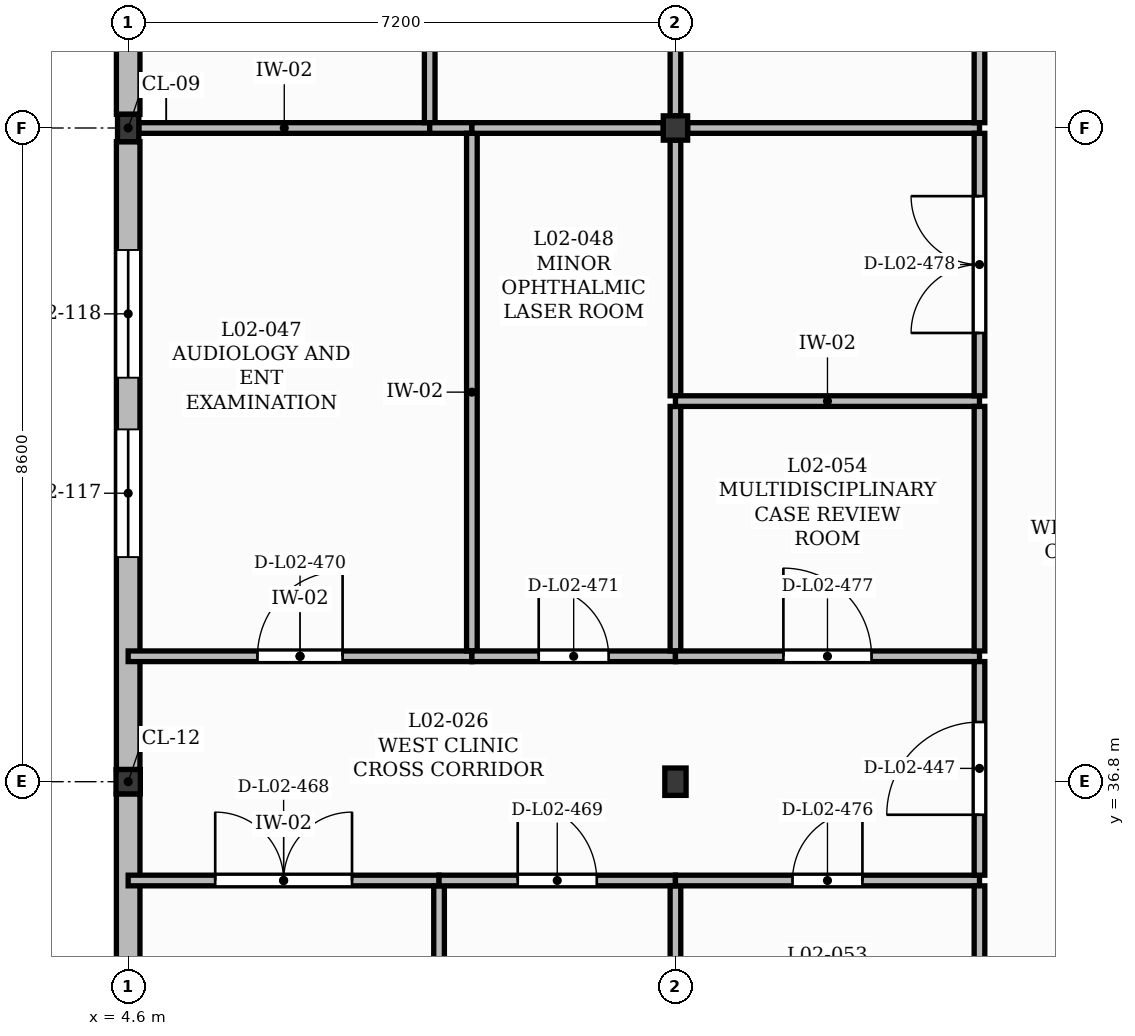
"""IFC4 building model, lengths in metres.
Left out: names, types, materials, properties, quantities, classifications, styles, units other than length and angle.
Written with IfcOpenShell. Run it as: python <this file> out.ifc"""

import sys

from ifc_helpers import new_model, si_unit, direction, frame, frame_2d, origin, origin_2d, place, context, subcontext, project, spatial, rectangle, extrude, element, fill, save


model = new_model("IFC4")
c1 = context("Model", 3, precision=1e-05, world=origin(), true_north=direction((0.0, 1.0)))
c2 = subcontext(c1, "Body", "Model", "MODEL_VIEW")
j1 = project(units=[si_unit("LENGTHUNIT", "METRE"), si_unit("PLANEANGLEUNIT", "RADIAN")], contexts=[c1])
p1 = place(None, origin())
s1 = spatial("IfcSite", under=j1, at=p1, CompositionType="ELEMENT")
p2 = place(p1, origin())
s2 = spatial("IfcBuilding", under=s1, at=p2, CompositionType="ELEMENT")
p3 = place(p2, frame((0.0, 0.0, 9.0)))
s3 = spatial("IfcBuildingStorey", under=s2, at=p3, CompositionType="ELEMENT", Elevation=9.0)
p4 = place(p3, frame((4.6, 36.8, 0.0), z_axis=(0.0, 0.0, 1.0), x_axis=(1.0, 0.0, 0.0)))
e1 = element("IfcColumn", 1, at=p4, inside=s3, PredefinedType="COLUMN", context=c2, shape_type="SweptSolid", body=[
    extrude(rectangle(XDim=0.32, YDim=0.32, at=origin_2d()), origin(), (0.0, 0.0, 1.0), 3.99),
])
for number, where, z_axis, x_axis in (
    (2, (4.6, 45.4, 0.0), (0.0, 0.0, 1.0), (1.0, 0.0, 0.0)),
    (3, (11.8, 36.8, 0.0), (0.0, 0.0, 1.0), (1.0, 0.0, 0.0)),
):
    element("IfcColumn", number, at=place(p3, frame(where, z_axis=z_axis, x_axis=x_axis)), inside=s3, PredefinedType="COLUMN", context=c2, shape_type="SweptSolid", body=[
        extrude(rectangle(XDim=0.28, YDim=0.36, at=origin_2d()), origin(), (0.0, 0.0, 1.0), 3.99),
    ])
p5 = place(p3, frame((11.8, 45.4, 0.0), z_axis=(0.0, 0.0, 1.0), x_axis=(1.0, 0.0, 0.0)))
e4 = element("IfcColumn", 4, at=p5, inside=s3, PredefinedType="COLUMN", context=c2, shape_type="SweptSolid", body=[
    extrude(rectangle(XDim=0.32, YDim=0.32, at=origin_2d()), origin(), (0.0, 0.0, 1.0), 3.99),
])
p6 = place(p3, frame((4.6, 27.38, 0.0), z_axis=(0.0, 0.0, 1.0), x_axis=(0.0, 1.0, 0.0)))
e5 = element("IfcWall", 5, at=p6, inside=s3, PredefinedType="SOLIDWALL", context=c2, shape_type="SweptSolid", body=[
    extrude(rectangle(XDim=9.26, YDim=0.31, at=frame_2d((4.63, 0.0))), origin(), (0.0, 0.0, 1.0), 3.53),
])
p7 = place(p6, frame((2.38, 0.0, 1.05)))
e6 = element("IfcOpeningElement", 6, at=p7, cuts=e5, PredefinedType="OPENING", context=c2, shape_type="SweptSolid", body=[
    extrude(rectangle(XDim=1.4, YDim=1.65, at=frame_2d((0.7, 0.825))), frame((0.0, 0.165, 0.0), z_axis=(0.0, -1.0, 0.0), x_axis=(1.0, 0.0, 0.0)), (0.0, 0.0, 1.0), 0.33),
])
p8 = place(p6, frame((4.46, 0.0, 1.05)))
e7 = element("IfcOpeningElement", 7, at=p8, cuts=e5, PredefinedType="OPENING", context=c2, shape_type="SweptSolid", body=[
    extrude(rectangle(XDim=1.4, YDim=1.65, at=frame_2d((0.7, 0.825))), frame((0.0, 0.165, 0.0), z_axis=(0.0, -1.0, 0.0), x_axis=(1.0, 0.0, 0.0)), (0.0, 0.0, 1.0), 0.33),
])
p9 = place(p3, frame((4.6, 36.96, 0.0), z_axis=(0.0, 0.0, 1.0), x_axis=(0.0, 1.0, 0.0)))
e8 = element("IfcWall", 8, at=p9, inside=s3, PredefinedType="SOLIDWALL", context=c2, shape_type="SweptSolid", body=[
    extrude(rectangle(XDim=8.26, YDim=0.31, at=frame_2d((4.13, 0.0))), origin(), (0.0, 0.0, 1.0), 3.53),
])
p10 = place(p9, frame((2.795, 0.0, 1.05)))
e9 = element("IfcOpeningElement", 9, at=p10, cuts=e8, PredefinedType="OPENING", context=c2, shape_type="SweptSolid", body=[
    extrude(rectangle(XDim=1.68, YDim=1.65, at=frame_2d((0.84, 0.825))), frame((0.0, 0.165, 0.0), z_axis=(0.0, -1.0, 0.0), x_axis=(1.0, 0.0, 0.0)), (0.0, 0.0, 1.0), 0.33),
])
p11 = place(p9, frame((5.155, 0.0, 1.05)))
e10 = element("IfcOpeningElement", 10, at=p11, cuts=e8, PredefinedType="OPENING", context=c2, shape_type="SweptSolid", body=[
    extrude(rectangle(XDim=1.68, YDim=1.65, at=frame_2d((0.84, 0.825))), frame((0.0, 0.165, 0.0), z_axis=(0.0, -1.0, 0.0), x_axis=(1.0, 0.0, 0.0)), (0.0, 0.0, 1.0), 0.33),
])
p12 = place(p3, frame((4.6, 45.58, 0.0), z_axis=(0.0, 0.0, 1.0), x_axis=(0.0, 1.0, 0.0)))
e11 = element("IfcWall", 11, at=p12, inside=s3, PredefinedType="SOLIDWALL", context=c2, shape_type="SweptSolid", body=[
    extrude(rectangle(XDim=6.86, YDim=0.31, at=frame_2d((3.43, 0.0))), origin(), (0.0, 0.0, 1.0), 3.53),
])
p13 = place(p12, frame((1.59, 0.0, 1.05)))
e12 = element("IfcOpeningElement", 12, at=p13, cuts=e11, PredefinedType="OPENING", context=c2, shape_type="SweptSolid", body=[
    extrude(rectangle(XDim=1.96, YDim=1.65, at=frame_2d((0.98, 0.825))), frame((0.0, 0.165, 0.0), z_axis=(0.0, -1.0, 0.0), x_axis=(1.0, 0.0, 0.0)), (0.0, 0.0, 1.0), 0.33),
])
p14 = place(p3, frame((4.6, 35.5, 0.0), z_axis=(0.0, 0.0, 1.0), x_axis=(1.0, 0.0, 0.0)))
e13 = element("IfcWall", 13, at=p14, inside=s3, PredefinedType="PARTITIONING", context=c2, shape_type="SweptSolid", body=[
    extrude(rectangle(XDim=4.09, YDim=0.14, at=frame_2d((2.045, 0.0))), origin(), (0.0, 0.0, 1.0), 3.96),
])
p15 = place(p14, frame((1.145, 0.0, 0.0)))
e14 = element("IfcOpeningElement", 14, at=p15, cuts=e13, PredefinedType="OPENING", context=c2, shape_type="SweptSolid", body=[
    extrude(rectangle(XDim=1.8, YDim=2.3, at=frame_2d((0.9, 1.15))), frame((0.0, 0.08, 0.0), z_axis=(0.0, -1.0, 0.0), x_axis=(1.0, 0.0, 0.0)), (0.0, 0.0, 1.0), 0.16),
])
p16 = place(p3, frame((4.6, 38.45, 0.0), z_axis=(0.0, 0.0, 1.0), x_axis=(1.0, 0.0, 0.0)))
e15 = element("IfcWall", 15, at=p16, inside=s3, PredefinedType="PARTITIONING", context=c2, shape_type="SweptSolid", body=[
    extrude(rectangle(XDim=4.522, YDim=0.14, at=frame_2d((2.261, 0.0))), origin(), (0.0, 0.0, 1.0), 3.96),
])
p17 = place(p16, frame((1.701, 0.0, 0.0)))
e16 = element("IfcOpeningElement", 16, at=p17, cuts=e15, PredefinedType="OPENING", context=c2, shape_type="SweptSolid", body=[
    extrude(rectangle(XDim=1.12, YDim=2.15, at=frame_2d((0.56, 1.075))), frame((0.0, 0.08, 0.0), z_axis=(0.0, -1.0, 0.0), x_axis=(1.0, 0.0, 0.0)), (0.0, 0.0, 1.0), 0.16),
])
p18 = place(p3, frame((4.74, 45.4, 0.0), z_axis=(0.0, 0.0, 1.0), x_axis=(1.0, 0.0, 0.0)))
e17 = element("IfcWall", 17, at=p18, inside=s3, PredefinedType="PARTITIONING", context=c2, shape_type="SweptSolid", body=[
    extrude(rectangle(XDim=3.827, YDim=0.14, at=frame_2d((1.914, 0.0))), origin(), (0.0, 0.0, 1.0), 3.39),
])
p19 = place(p3, frame((8.567, 45.47, 0.0), z_axis=(0.0, 0.0, 1.0), x_axis=(0.0, 1.0, 0.0)))
e18 = element("IfcWall", 18, at=p19, inside=s3, PredefinedType="PARTITIONING", context=c2, shape_type="SweptSolid", body=[
    extrude(rectangle(XDim=5.06, YDim=0.14, at=frame_2d((2.53, 0.0))), origin(), (0.0, 0.0, 1.0), 3.96),
])
p20 = place(p3, frame((8.567, 45.4, 0.0), z_axis=(0.0, 0.0, 1.0), x_axis=(1.0, 0.0, 0.0)))
e19 = element("IfcWall", 19, at=p20, inside=s3, PredefinedType="PARTITIONING", context=c2, shape_type="SweptSolid", body=[
    extrude(rectangle(XDim=0.555, YDim=0.14, at=frame_2d((0.278, 0.0))), origin(), (0.0, 0.0, 1.0), 3.39),
])
p21 = place(p3, frame((8.69, 27.2, 0.0), z_axis=(0.0, 0.0, 1.0), x_axis=(0.0, 1.0, 0.0)))
e20 = element("IfcWall", 20, at=p21, inside=s3, PredefinedType="PARTITIONING", context=c2, shape_type="SweptSolid", body=[
    extrude(rectangle(XDim=8.23, YDim=0.14, at=frame_2d((4.115, 0.0))), origin(), (0.0, 0.0, 1.0), 3.96),
])
p22 = place(p3, frame((8.69, 35.5, 0.0), z_axis=(0.0, 0.0, 1.0), x_axis=(1.0, 0.0, 0.0)))
e21 = element("IfcWall", 21, at=p22, inside=s3, PredefinedType="PARTITIONING", context=c2, shape_type="SweptSolid", body=[
    extrude(rectangle(XDim=3.11, YDim=0.14, at=frame_2d((1.555, 0.0))), origin(), (0.0, 0.0, 1.0), 3.96),
])
p23 = place(p22, frame((1.035, 0.0, 0.0)))
e22 = element("IfcOpeningElement", 22, at=p23, cuts=e21, PredefinedType="OPENING", context=c2, shape_type="SweptSolid", body=[
    extrude(rectangle(XDim=1.04, YDim=2.1, at=frame_2d((0.52, 1.05))), frame((0.0, 0.08, 0.0), z_axis=(0.0, -1.0, 0.0), x_axis=(1.0, 0.0, 0.0)), (0.0, 0.0, 1.0), 0.16),
])
p24 = place(p3, frame((9.122, 38.52, 0.0), z_axis=(0.0, 0.0, 1.0), x_axis=(0.0, 1.0, 0.0)))
e23 = element("IfcWall", 23, at=p24, inside=s3, PredefinedType="PARTITIONING", context=c2, shape_type="SweptSolid", body=[
    extrude(rectangle(XDim=6.81, YDim=0.14, at=frame_2d((3.405, 0.0))), origin(), (0.0, 0.0, 1.0), 3.96),
])
p25 = place(p3, frame((9.122, 38.45, 0.0), z_axis=(0.0, 0.0, 1.0), x_axis=(1.0, 0.0, 0.0)))
e24 = element("IfcWall", 24, at=p25, inside=s3, PredefinedType="PARTITIONING", context=c2, shape_type="SweptSolid", body=[
    extrude(rectangle(XDim=2.678, YDim=0.14, at=frame_2d((1.339, 0.0))), origin(), (0.0, 0.0, 1.0), 3.96),
])
p26 = place(p25, frame((0.879, 0.0, 0.0)))
e25 = element("IfcOpeningElement", 25, at=p26, cuts=e24, PredefinedType="OPENING", context=c2, shape_type="SweptSolid", body=[
    extrude(rectangle(XDim=0.92, YDim=2.1, at=frame_2d((0.46, 1.05))), frame((0.0, 0.08, 0.0), z_axis=(0.0, -1.0, 0.0), x_axis=(1.0, 0.0, 0.0)), (0.0, 0.0, 1.0), 0.16),
])
p27 = place(p3, frame((9.122, 45.4, 0.0), z_axis=(0.0, 0.0, 1.0), x_axis=(1.0, 0.0, 0.0)))
e26 = element("IfcWall", 26, at=p27, inside=s3, PredefinedType="PARTITIONING", context=c2, shape_type="SweptSolid", body=[
    extrude(rectangle(XDim=2.518, YDim=0.14, at=frame_2d((1.259, 0.0))), origin(), (0.0, 0.0, 1.0), 3.39),
])
p28 = place(p3, frame((11.8, 32.192, 0.0), z_axis=(0.0, 0.0, 1.0), x_axis=(0.0, 1.0, 0.0)))
e27 = element("IfcWall", 27, at=p28, inside=s3, PredefinedType="PARTITIONING", context=c2, shape_type="SweptSolid", body=[
    extrude(rectangle(XDim=3.238, YDim=0.14, at=frame_2d((1.619, 0.0))), origin(), (0.0, 0.0, 1.0), 3.35),
])
p29 = place(p3, frame((11.8, 35.5, 0.0), z_axis=(0.0, 0.0, 1.0), x_axis=(1.0, 0.0, 0.0)))
e28 = element("IfcWall", 28, at=p29, inside=s3, PredefinedType="PARTITIONING", context=c2, shape_type="SweptSolid", body=[
    extrude(rectangle(XDim=4.0, YDim=0.14, at=frame_2d((2.0, 0.0))), origin(), (0.0, 0.0, 1.0), 3.96),
])
p30 = place(p29, frame((1.54, 0.0, 0.0)))
e29 = element("IfcOpeningElement", 29, at=p30, cuts=e28, PredefinedType="OPENING", context=c2, shape_type="SweptSolid", body=[
    extrude(rectangle(XDim=0.92, YDim=2.1, at=frame_2d((0.46, 1.05))), frame((0.0, 0.08, 0.0), z_axis=(0.0, -1.0, 0.0), x_axis=(1.0, 0.0, 0.0)), (0.0, 0.0, 1.0), 0.16),
])
p31 = place(p3, frame((11.8, 38.52, 0.0), z_axis=(0.0, 0.0, 1.0), x_axis=(0.0, 1.0, 0.0)))
e30 = element("IfcWall", 30, at=p31, inside=s3, PredefinedType="PARTITIONING", context=c2, shape_type="SweptSolid", body=[
    extrude(rectangle(XDim=3.217, YDim=0.14, at=frame_2d((1.608, 0.0))), origin(), (0.0, 0.0, 1.0), 3.35),
])
p32 = place(p3, frame((11.8, 38.45, 0.0), z_axis=(0.0, 0.0, 1.0), x_axis=(1.0, 0.0, 0.0)))
e31 = element("IfcWall", 31, at=p32, inside=s3, PredefinedType="PARTITIONING", context=c2, shape_type="SweptSolid", body=[
    extrude(rectangle(XDim=4.0, YDim=0.14, at=frame_2d((2.0, 0.0))), origin(), (0.0, 0.0, 1.0), 3.96),
])
p33 = place(p32, frame((1.42, 0.0, 0.0)))
e32 = element("IfcOpeningElement", 32, at=p33, cuts=e31, PredefinedType="OPENING", context=c2, shape_type="SweptSolid", body=[
    extrude(rectangle(XDim=1.16, YDim=2.1, at=frame_2d((0.58, 1.05))), frame((0.0, 0.08, 0.0), z_axis=(0.0, -1.0, 0.0), x_axis=(1.0, 0.0, 0.0)), (0.0, 0.0, 1.0), 0.16),
])
p34 = place(p3, frame((11.8, 41.877, 0.0), z_axis=(0.0, 0.0, 1.0), x_axis=(0.0, 1.0, 0.0)))
e33 = element("IfcWall", 33, at=p34, inside=s3, PredefinedType="PARTITIONING", context=c2, shape_type="SweptSolid", body=[
    extrude(rectangle(XDim=3.363, YDim=0.14, at=frame_2d((1.682, 0.0))), origin(), (0.0, 0.0, 1.0), 3.35),
])
p35 = place(p3, frame((11.8, 41.807, 0.0), z_axis=(0.0, 0.0, 1.0), x_axis=(1.0, 0.0, 0.0)))
e34 = element("IfcWall", 34, at=p35, inside=s3, PredefinedType="PARTITIONING", context=c2, shape_type="SweptSolid", body=[
    extrude(rectangle(XDim=4.0, YDim=0.14, at=frame_2d((2.0, 0.0))), origin(), (0.0, 0.0, 1.0), 3.96),
])
p36 = place(p3, frame((11.8, 45.56, 0.0), z_axis=(0.0, 0.0, 1.0), x_axis=(0.0, 1.0, 0.0)))
e35 = element("IfcWall", 35, at=p36, inside=s3, PredefinedType="PARTITIONING", context=c2, shape_type="SweptSolid", body=[
    extrude(rectangle(XDim=4.97, YDim=0.14, at=frame_2d((2.485, 0.0))), origin(), (0.0, 0.0, 1.0), 3.47),
])
p37 = place(p3, frame((11.96, 45.4, 0.0), z_axis=(0.0, 0.0, 1.0), x_axis=(1.0, 0.0, 0.0)))
e36 = element("IfcWall", 36, at=p37, inside=s3, PredefinedType="PARTITIONING", context=c2, shape_type="SweptSolid", body=[
    extrude(rectangle(XDim=3.84, YDim=0.14, at=frame_2d((1.92, 0.0))), origin(), (0.0, 0.0, 1.0), 3.31),
])
p38 = place(p3, frame((15.8, 32.192, 0.0), z_axis=(0.0, 0.0, 1.0), x_axis=(0.0, 1.0, 0.0)))
e37 = element("IfcWall", 37, at=p38, inside=s3, PredefinedType="PARTITIONING", context=c2, shape_type="SweptSolid", body=[
    extrude(rectangle(XDim=3.238, YDim=0.14, at=frame_2d((1.619, 0.0))), origin(), (0.0, 0.0, 1.0), 3.96),
])
p39 = place(p3, frame((15.8, 35.57, 0.0), z_axis=(0.0, 0.0, 1.0), x_axis=(0.0, 1.0, 0.0)))
e38 = element("IfcWall", 38, at=p39, inside=s3, PredefinedType="PARTITIONING", context=c2, shape_type="SweptSolid", body=[
    extrude(rectangle(XDim=2.81, YDim=0.14, at=frame_2d((1.405, 0.0))), origin(), (0.0, 0.0, 1.0), 3.96),
])
p40 = place(p39, frame((0.795, 0.0, 0.0)))
e39 = element("IfcOpeningElement", 39, at=p40, cuts=e38, PredefinedType="OPENING", context=c2, shape_type="SweptSolid", body=[
    extrude(rectangle(XDim=1.22, YDim=2.1, at=frame_2d((0.61, 1.05))), frame((0.0, 0.08, 0.0), z_axis=(0.0, -1.0, 0.0), x_axis=(1.0, 0.0, 0.0)), (0.0, 0.0, 1.0), 0.16),
])
p41 = place(p3, frame((15.8, 38.52, 0.0), z_axis=(0.0, 0.0, 1.0), x_axis=(0.0, 1.0, 0.0)))
e40 = element("IfcWall", 40, at=p41, inside=s3, PredefinedType="PARTITIONING", context=c2, shape_type="SweptSolid", body=[
    extrude(rectangle(XDim=3.217, YDim=0.14, at=frame_2d((1.608, 0.0))), origin(), (0.0, 0.0, 1.0), 3.96),
])
p42 = place(p3, frame((15.8, 41.877, 0.0), z_axis=(0.0, 0.0, 1.0), x_axis=(0.0, 1.0, 0.0)))
e41 = element("IfcWall", 41, at=p42, inside=s3, PredefinedType="PARTITIONING", context=c2, shape_type="SweptSolid", body=[
    extrude(rectangle(XDim=3.453, YDim=0.14, at=frame_2d((1.727, 0.0))), origin(), (0.0, 0.0, 1.0), 3.96),
])
p43 = place(p42, frame((0.826, 0.0, 0.0)))
e42 = element("IfcOpeningElement", 42, at=p43, cuts=e41, PredefinedType="OPENING", context=c2, shape_type="SweptSolid", body=[
    extrude(rectangle(XDim=1.8, YDim=2.3, at=frame_2d((0.9, 1.15))), frame((0.0, 0.08, 0.0), z_axis=(0.0, -1.0, 0.0), x_axis=(1.0, 0.0, 0.0)), (0.0, 0.0, 1.0), 0.16),
])
p44 = place(p3, frame((15.8, 45.47, 0.0), z_axis=(0.0, 0.0, 1.0), x_axis=(0.0, 1.0, 0.0)))
e43 = element("IfcWall", 43, at=p44, inside=s3, PredefinedType="PARTITIONING", context=c2, shape_type="SweptSolid", body=[
    extrude(rectangle(XDim=5.06, YDim=0.14, at=frame_2d((2.53, 0.0))), origin(), (0.0, 0.0, 1.0), 3.96),
])
p45 = place(p10, origin())
e44 = element("IfcWindow", 44, at=p45, inside=s3, PartitioningType="DOUBLE_PANEL_VERTICAL", PredefinedType="WINDOW", context=c2, shape_type="SweptSolid", body=[
    extrude(rectangle(XDim=1.68, YDim=1.65, at=frame_2d((0.84, 0.825))), frame((0.0, 0.03, 0.0), z_axis=(0.0, -1.0, 0.0), x_axis=(1.0, 0.0, 0.0)), (0.0, 0.0, 1.0), 0.06),
])
fill(e9, e44)
p46 = place(p11, origin())
e45 = element("IfcWindow", 45, at=p46, inside=s3, PartitioningType="DOUBLE_PANEL_VERTICAL", PredefinedType="WINDOW", context=c2, shape_type="SweptSolid", body=[
    extrude(rectangle(XDim=1.68, YDim=1.65, at=frame_2d((0.84, 0.825))), frame((0.0, 0.03, 0.0), z_axis=(0.0, -1.0, 0.0), x_axis=(1.0, 0.0, 0.0)), (0.0, 0.0, 1.0), 0.06),
])
fill(e10, e45)
p47 = place(p40, origin())
e46 = element("IfcDoor", 46, at=p47, inside=s3, OperationType="SINGLE_SWING_LEFT", PredefinedType="DOOR", context=c2, shape_type="SweptSolid", body=[
    extrude(rectangle(XDim=1.22, YDim=2.1, at=frame_2d((0.61, 1.05))), frame((0.0, 0.025, 0.0), z_axis=(0.0, -1.0, 0.0), x_axis=(1.0, 0.0, 0.0)), (0.0, 0.0, 1.0), 0.05),
])
fill(e39, e46)
p48 = place(p15, origin())
e47 = element("IfcDoor", 47, at=p48, inside=s3, OperationType="DOUBLE_DOOR_SINGLE_SWING", PredefinedType="DOOR", context=c2, shape_type="SweptSolid", body=[
    extrude(rectangle(XDim=1.8, YDim=2.3, at=frame_2d((0.9, 1.15))), frame((0.0, 0.025, 0.0), z_axis=(0.0, -1.0, 0.0), x_axis=(1.0, 0.0, 0.0)), (0.0, 0.0, 1.0), 0.05),
])
fill(e14, e47)
p49 = place(p23, origin())
e48 = element("IfcDoor", 48, at=p49, inside=s3, OperationType="SINGLE_SWING_LEFT", PredefinedType="DOOR", context=c2, shape_type="SweptSolid", body=[
    extrude(rectangle(XDim=1.04, YDim=2.1, at=frame_2d((0.52, 1.05))), frame((0.0, 0.025, 0.0), z_axis=(0.0, -1.0, 0.0), x_axis=(1.0, 0.0, 0.0)), (0.0, 0.0, 1.0), 0.05),
])
fill(e22, e48)
p50 = place(p17, origin())
e49 = element("IfcDoor", 49, at=p50, inside=s3, OperationType="SINGLE_SWING_RIGHT", PredefinedType="DOOR", context=c2, shape_type="SweptSolid", body=[
    extrude(rectangle(XDim=1.12, YDim=2.15, at=frame_2d((0.56, 1.075))), frame((0.0, 0.025, 0.0), z_axis=(0.0, -1.0, 0.0), x_axis=(1.0, 0.0, 0.0)), (0.0, 0.0, 1.0), 0.05),
])
fill(e16, e49)
p51 = place(p26, origin())
e50 = element("IfcDoor", 50, at=p51, inside=s3, OperationType="SINGLE_SWING_LEFT", PredefinedType="DOOR", context=c2, shape_type="SweptSolid", body=[
    extrude(rectangle(XDim=0.92, YDim=2.1, at=frame_2d((0.46, 1.05))), frame((0.0, 0.025, 0.0), z_axis=(0.0, -1.0, 0.0), x_axis=(1.0, 0.0, 0.0)), (0.0, 0.0, 1.0), 0.05),
])
fill(e25, e50)
p52 = place(p30, origin())
e51 = element("IfcDoor", 51, at=p52, inside=s3, OperationType="SINGLE_SWING_RIGHT", PredefinedType="DOOR", context=c2, shape_type="SweptSolid", body=[
    extrude(rectangle(XDim=0.92, YDim=2.1, at=frame_2d((0.46, 1.05))), frame((0.0, 0.025, 0.0), z_axis=(0.0, -1.0, 0.0), x_axis=(1.0, 0.0, 0.0)), (0.0, 0.0, 1.0), 0.05),
])
fill(e29, e51)
p53 = place(p33, origin())
e52 = element("IfcDoor", 52, at=p53, inside=s3, OperationType="SINGLE_SWING_LEFT", PredefinedType="DOOR", context=c2, shape_type="SweptSolid", body=[
    extrude(rectangle(XDim=1.16, YDim=2.1, at=frame_2d((0.58, 1.05))), frame((0.0, 0.025, 0.0), z_axis=(0.0, -1.0, 0.0), x_axis=(1.0, 0.0, 0.0)), (0.0, 0.0, 1.0), 0.05),
])
fill(e32, e52)
p54 = place(p43, origin())
e53 = element("IfcDoor", 53, at=p54, inside=s3, OperationType="DOUBLE_DOOR_SINGLE_SWING", PredefinedType="DOOR", context=c2, shape_type="SweptSolid", body=[
    extrude(rectangle(XDim=1.8, YDim=2.3, at=frame_2d((0.9, 1.15))), frame((0.0, 0.025, 0.0), z_axis=(0.0, -1.0, 0.0), x_axis=(1.0, 0.0, 0.0)), (0.0, 0.0, 1.0), 0.05),
])
fill(e42, e53)
save(model, sys.argv[1])
